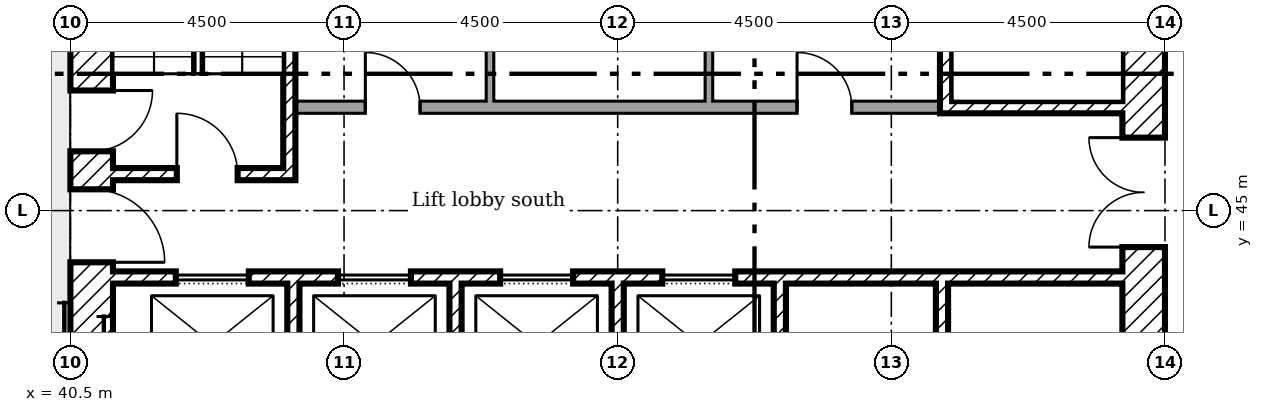
"""IFC4 building model, lengths in metres.
Left out: names, types, materials, properties, quantities, classifications, styles, units other than length and angle.
Written with IfcOpenShell. Run it as: python <this file> out.ifc"""

import sys

from ifc_helpers import new_model, si_unit, direction, frame, frame_2d, origin, place, context, subcontext, project, spatial, rectangle, extrude, element, fill, save


model = new_model("IFC4")
c1 = context("Model", 3, precision=1e-05, world=origin(), true_north=direction((0.0, 1.0)))
c2 = subcontext(c1, "Body", "Model", "MODEL_VIEW")
j1 = project(units=[si_unit("LENGTHUNIT", "METRE"), si_unit("PLANEANGLEUNIT", "RADIAN")], contexts=[c1])
p1 = place(None, origin())
s1 = spatial("IfcSite", under=j1, at=p1, CompositionType="ELEMENT")
p2 = place(p1, origin())
s2 = spatial("IfcBuilding", under=s1, at=p2, CompositionType="ELEMENT")
p3 = place(p2, frame((0.0, 0.0, 92.0)))
s3 = spatial("IfcBuildingStorey", under=s2, at=p3, CompositionType="ELEMENT", Elevation=92.0)
p4 = place(p3, frame((58.15, 40.5, 0.0), z_axis=(0.0, 0.0, 1.0), x_axis=(0.0, 1.0, 0.0)))
e1 = element("IfcWall", 1, at=p4, inside=s3, PredefinedType="SHEAR", context=c2, shape_type="SweptSolid", body=[
    extrude(rectangle(XDim=18.0, YDim=0.7, at=frame_2d((9.0, 0.0))), origin(), (0.0, 0.0, 1.0), 3.35),
])
p5 = place(p4, frame((13.15, 0.0, 0.0)))
e2 = element("IfcOpeningElement", 2, at=p5, cuts=e1, PredefinedType="OPENING", context=c2, shape_type="SweptSolid", body=[
    extrude(rectangle(XDim=1.2, YDim=2.1, at=frame_2d((0.6, 1.05))), frame((0.0, 0.36, 0.0), z_axis=(0.0, -1.0, 0.0), x_axis=(1.0, 0.0, 0.0)), (0.0, 0.0, 1.0), 0.72),
])
p6 = place(p4, frame((3.9, 0.0, 0.0)))
e3 = element("IfcOpeningElement", 3, at=p6, cuts=e1, PredefinedType="OPENING", context=c2, shape_type="SweptSolid", body=[
    extrude(rectangle(XDim=1.8, YDim=2.1, at=frame_2d((0.9, 1.05))), frame((0.0, 0.36, 0.0), z_axis=(0.0, -1.0, 0.0), x_axis=(1.0, 0.0, 0.0)), (0.0, 0.0, 1.0), 0.72),
])
p7 = place(p4, frame((11.525, 0.0, 0.0)))
e4 = element("IfcOpeningElement", 4, at=p7, cuts=e1, PredefinedType="OPENING", context=c2, shape_type="SweptSolid", body=[
    extrude(rectangle(XDim=1.0, YDim=2.1, at=frame_2d((0.5, 1.05))), frame((0.0, 0.36, 0.0), z_axis=(0.0, -1.0, 0.0), x_axis=(1.0, 0.0, 0.0)), (0.0, 0.0, 1.0), 0.72),
])
p8 = place(p3, frame((40.85, 40.5, 0.0), z_axis=(0.0, 0.0, 1.0), x_axis=(0.0, 1.0, 0.0)))
e5 = element("IfcWall", 5, at=p8, inside=s3, PredefinedType="SHEAR", context=c2, shape_type="SweptSolid", body=[
    extrude(rectangle(XDim=18.0, YDim=0.7, at=frame_2d((9.0, 0.0))), origin(), (0.0, 0.0, 1.0), 3.35),
])
p9 = place(p8, frame((3.65, 0.0, 0.0)))
e6 = element("IfcOpeningElement", 6, at=p9, cuts=e5, PredefinedType="OPENING", context=c2, shape_type="SweptSolid", body=[
    extrude(rectangle(XDim=1.2, YDim=2.1, at=frame_2d((0.6, 1.05))), frame((0.0, 0.36, 0.0), z_axis=(0.0, -1.0, 0.0), x_axis=(1.0, 0.0, 0.0)), (0.0, 0.0, 1.0), 0.72),
])
p10 = place(p8, frame((5.475, 0.0, 0.0)))
e7 = element("IfcOpeningElement", 7, at=p10, cuts=e5, PredefinedType="OPENING", context=c2, shape_type="SweptSolid", body=[
    extrude(rectangle(XDim=1.0, YDim=2.1, at=frame_2d((0.5, 1.05))), frame((0.0, 0.36, 0.0), z_axis=(0.0, -1.0, 0.0), x_axis=(1.0, 0.0, 0.0)), (0.0, 0.0, 1.0), 0.72),
])
p11 = place(p8, frame((12.3, 0.0, 0.0)))
e8 = element("IfcOpeningElement", 8, at=p11, cuts=e5, PredefinedType="OPENING", context=c2, shape_type="SweptSolid", body=[
    extrude(rectangle(XDim=1.0, YDim=2.1, at=frame_2d((0.5, 1.05))), frame((0.0, 0.36, 0.0), z_axis=(0.0, -1.0, 0.0), x_axis=(1.0, 0.0, 0.0)), (0.0, 0.0, 1.0), 0.72),
])
for number, where, z_axis, x_axis in (
    (9, (44.167, 41.2, 0.0), (0.0, 0.0, 1.0), (0.0, 1.0, 0.0)),
    (10, (46.833, 41.2, 0.0), (0.0, 0.0, 1.0), (0.0, 1.0, 0.0)),
    (11, (49.5, 41.2, 0.0), (0.0, 0.0, 1.0), (0.0, 1.0, 0.0)),
    (12, (52.167, 41.2, 0.0), (0.0, 0.0, 1.0), (0.0, 1.0, 0.0)),
    (13, (54.833, 41.2, 0.0), (0.0, 0.0, 1.0), (0.0, 1.0, 0.0)),
):
    element("IfcWall", number, at=place(p3, frame(where, z_axis=z_axis, x_axis=x_axis)), inside=s3, PredefinedType="SHEAR", context=c2, shape_type="SweptSolid", body=[
        extrude(rectangle(XDim=2.6, YDim=0.2, at=frame_2d((1.3, 0.0))), origin(), (0.0, 0.0, 1.0), 3.35),
    ])
p12 = place(p3, frame((41.2, 43.9, 0.0)))
e14 = element("IfcWall", 14, at=p12, inside=s3, PredefinedType="SHEAR", context=c2, shape_type="SweptSolid", body=[
    extrude(rectangle(XDim=16.6, YDim=0.2, at=frame_2d((8.3, 0.0))), origin(), (0.0, 0.0, 1.0), 3.35),
])
p13 = place(p12, frame((1.033, 0.0, 0.0)))
e15 = element("IfcOpeningElement", 15, at=p13, cuts=e14, PredefinedType="OPENING", context=c2, shape_type="SweptSolid", body=[
    extrude(rectangle(XDim=1.2, YDim=2.1, at=frame_2d((0.6, 1.05))), frame((0.0, 0.11, 0.0), z_axis=(0.0, -1.0, 0.0), x_axis=(1.0, 0.0, 0.0)), (0.0, 0.0, 1.0), 0.22),
])
p14 = place(p12, frame((3.7, 0.0, 0.0)))
e16 = element("IfcOpeningElement", 16, at=p14, cuts=e14, PredefinedType="OPENING", context=c2, shape_type="SweptSolid", body=[
    extrude(rectangle(XDim=1.2, YDim=2.1, at=frame_2d((0.6, 1.05))), frame((0.0, 0.11, 0.0), z_axis=(0.0, -1.0, 0.0), x_axis=(1.0, 0.0, 0.0)), (0.0, 0.0, 1.0), 0.22),
])
p15 = place(p12, frame((6.367, 0.0, 0.0)))
e17 = element("IfcOpeningElement", 17, at=p15, cuts=e14, PredefinedType="OPENING", context=c2, shape_type="SweptSolid", body=[
    extrude(rectangle(XDim=1.2, YDim=2.1, at=frame_2d((0.6, 1.05))), frame((0.0, 0.11, 0.0), z_axis=(0.0, -1.0, 0.0), x_axis=(1.0, 0.0, 0.0)), (0.0, 0.0, 1.0), 0.22),
])
p16 = place(p12, frame((9.033, 0.0, 0.0)))
e18 = element("IfcOpeningElement", 18, at=p16, cuts=e14, PredefinedType="OPENING", context=c2, shape_type="SweptSolid", body=[
    extrude(rectangle(XDim=1.2, YDim=2.1, at=frame_2d((0.6, 1.05))), frame((0.0, 0.11, 0.0), z_axis=(0.0, -1.0, 0.0), x_axis=(1.0, 0.0, 0.0)), (0.0, 0.0, 1.0), 0.22),
])
p17 = place(p3, frame((44.1, 45.5, 0.0), z_axis=(0.0, 0.0, 1.0), x_axis=(0.0, 1.0, 0.0)))
e19 = element("IfcWall", 19, at=p17, inside=s3, PredefinedType="SHEAR", context=c2, shape_type="SweptSolid", body=[
    extrude(rectangle(XDim=6.9, YDim=0.2, at=frame_2d((3.45, 0.0))), origin(), (0.0, 0.0, 1.0), 3.35),
])
p18 = place(p3, frame((41.2, 45.6, 0.0)))
e20 = element("IfcWall", 20, at=p18, inside=s3, PredefinedType="SHEAR", context=c2, shape_type="SweptSolid", body=[
    extrude(rectangle(XDim=2.8, YDim=0.2, at=frame_2d((1.4, 0.0))), origin(), (0.0, 0.0, 1.0), 3.35),
])
p19 = place(p18, frame((1.05, 0.0, 0.0)))
e21 = element("IfcOpeningElement", 21, at=p19, cuts=e20, PredefinedType="OPENING", context=c2, shape_type="SweptSolid", body=[
    extrude(rectangle(XDim=1.0, YDim=2.1, at=frame_2d((0.5, 1.05))), frame((0.0, 0.11, 0.0), z_axis=(0.0, -1.0, 0.0), x_axis=(1.0, 0.0, 0.0)), (0.0, 0.0, 1.0), 0.22),
])
p20 = place(p3, frame((54.8, 46.7, 0.0)))
e22 = element("IfcWall", 22, at=p20, inside=s3, PredefinedType="SHEAR", context=c2, shape_type="SweptSolid", body=[
    extrude(rectangle(XDim=3.0, YDim=0.2, at=frame_2d((1.5, 0.0))), origin(), (0.0, 0.0, 1.0), 3.35),
])
p21 = place(p3, frame((54.9, 46.8, 0.0), z_axis=(0.0, 0.0, 1.0), x_axis=(0.0, 1.0, 0.0)))
e23 = element("IfcWall", 23, at=p21, inside=s3, PredefinedType="SHEAR", context=c2, shape_type="SweptSolid", body=[
    extrude(rectangle(XDim=6.5, YDim=0.2, at=frame_2d((3.25, 0.0))), origin(), (0.0, 0.0, 1.0), 3.35),
])
p22 = place(p3, frame((44.2, 46.7, 0.0)))
e24 = element("IfcWall", 24, at=p22, inside=s3, PredefinedType="PARTITIONING", context=c2, shape_type="SweptSolid", body=[
    extrude(rectangle(XDim=10.6, YDim=0.2, at=frame_2d((5.3, 0.0))), origin(), (0.0, 0.0, 1.0), 3.35),
])
p23 = place(p22, frame((1.15, 0.0, 0.0)))
e25 = element("IfcOpeningElement", 25, at=p23, cuts=e24, PredefinedType="OPENING", context=c2, shape_type="SweptSolid", body=[
    extrude(rectangle(XDim=0.9, YDim=2.1, at=frame_2d((0.45, 1.05))), frame((0.0, 0.11, 0.0), z_axis=(0.0, -1.0, 0.0), x_axis=(1.0, 0.0, 0.0)), (0.0, 0.0, 1.0), 0.22),
])
p24 = place(p22, frame((8.25, 0.0, 0.0)))
e26 = element("IfcOpeningElement", 26, at=p24, cuts=e24, PredefinedType="OPENING", context=c2, shape_type="SweptSolid", body=[
    extrude(rectangle(XDim=0.9, YDim=2.1, at=frame_2d((0.45, 1.05))), frame((0.0, 0.11, 0.0), z_axis=(0.0, -1.0, 0.0), x_axis=(1.0, 0.0, 0.0)), (0.0, 0.0, 1.0), 0.22),
])
p25 = place(p3, frame((47.4, 46.8, 0.0), z_axis=(0.0, 0.0, 1.0), x_axis=(0.0, 1.0, 0.0)))
e27 = element("IfcWall", 27, at=p25, inside=s3, PredefinedType="PARTITIONING", context=c2, shape_type="SweptSolid", body=[
    extrude(rectangle(XDim=5.0, YDim=0.125, at=frame_2d((2.5, 0.0))), origin(), (0.0, 0.0, 1.0), 3.35),
])
p26 = place(p3, frame((51.0, 46.8, 0.0), z_axis=(0.0, 0.0, 1.0), x_axis=(0.0, 1.0, 0.0)))
e28 = element("IfcWall", 28, at=p26, inside=s3, PredefinedType="PARTITIONING", context=c2, shape_type="SweptSolid", body=[
    extrude(rectangle(XDim=2.262, YDim=0.125, at=frame_2d((1.131, 0.0))), origin(), (0.0, 0.0, 1.0), 3.35),
])
p27 = place(p6, origin())
e29 = element("IfcDoor", 29, at=p27, inside=s3, OperationType="DOUBLE_DOOR_SINGLE_SWING", PredefinedType="DOOR", context=c2, shape_type="SweptSolid", body=[
    extrude(rectangle(XDim=1.8, YDim=2.1, at=frame_2d((0.9, 1.05))), frame((0.0, 0.025, 0.0), z_axis=(0.0, -1.0, 0.0), x_axis=(1.0, 0.0, 0.0)), (0.0, 0.0, 1.0), 0.05),
])
fill(e3, e29)
p28 = place(p9, frame((1.2, 0.0, 0.0), x_axis=(-1.0, 0.0, 0.0)))
e30 = element("IfcDoor", 30, at=p28, inside=s3, OperationType="SINGLE_SWING_LEFT", PredefinedType="DOOR", context=c2, shape_type="SweptSolid", body=[
    extrude(rectangle(XDim=1.2, YDim=2.1, at=frame_2d((0.6, 1.05))), frame((0.0, 0.025, 0.0), z_axis=(0.0, -1.0, 0.0), x_axis=(1.0, 0.0, 0.0)), (0.0, 0.0, 1.0), 0.05),
])
fill(e6, e30)
p29 = place(p19, origin())
e31 = element("IfcDoor", 31, at=p29, inside=s3, OperationType="SINGLE_SWING_RIGHT", PredefinedType="DOOR", context=c2, shape_type="SweptSolid", body=[
    extrude(rectangle(XDim=1.0, YDim=2.1, at=frame_2d((0.5, 1.05))), frame((0.0, 0.025, 0.0), z_axis=(0.0, -1.0, 0.0), x_axis=(1.0, 0.0, 0.0)), (0.0, 0.0, 1.0), 0.05),
])
fill(e21, e31)
p30 = place(p10, frame((1.0, 0.0, 0.0), x_axis=(-1.0, 0.0, 0.0)))
e32 = element("IfcDoor", 32, at=p30, inside=s3, OperationType="SINGLE_SWING_RIGHT", PredefinedType="DOOR", context=c2, shape_type="SweptSolid", body=[
    extrude(rectangle(XDim=1.0, YDim=2.1, at=frame_2d((0.5, 1.05))), frame((0.0, 0.025, 0.0), z_axis=(0.0, -1.0, 0.0), x_axis=(1.0, 0.0, 0.0)), (0.0, 0.0, 1.0), 0.05),
])
fill(e7, e32)
p31 = place(p23, origin())
e33 = element("IfcDoor", 33, at=p31, inside=s3, OperationType="SINGLE_SWING_RIGHT", PredefinedType="DOOR", context=c2, shape_type="SweptSolid", body=[
    extrude(rectangle(XDim=0.9, YDim=2.1, at=frame_2d((0.45, 1.05))), frame((0.0, 0.025, 0.0), z_axis=(0.0, -1.0, 0.0), x_axis=(1.0, 0.0, 0.0)), (0.0, 0.0, 1.0), 0.05),
])
fill(e25, e33)
p32 = place(p24, origin())
e34 = element("IfcDoor", 34, at=p32, inside=s3, OperationType="SINGLE_SWING_RIGHT", PredefinedType="DOOR", context=c2, shape_type="SweptSolid", body=[
    extrude(rectangle(XDim=0.9, YDim=2.1, at=frame_2d((0.45, 1.05))), frame((0.0, 0.025, 0.0), z_axis=(0.0, -1.0, 0.0), x_axis=(1.0, 0.0, 0.0)), (0.0, 0.0, 1.0), 0.05),
])
fill(e26, e34)
p33 = place(p13, origin())
e35 = element("IfcDoor", 35, at=p33, inside=s3, OperationType="SLIDING_TO_LEFT", PredefinedType="DOOR", context=c2, shape_type="SweptSolid", body=[
    extrude(rectangle(XDim=1.2, YDim=2.1, at=frame_2d((0.6, 1.05))), frame((0.0, 0.025, 0.0), z_axis=(0.0, -1.0, 0.0), x_axis=(1.0, 0.0, 0.0)), (0.0, 0.0, 1.0), 0.05),
])
fill(e15, e35)
p34 = place(p14, origin())
e36 = element("IfcDoor", 36, at=p34, inside=s3, OperationType="SLIDING_TO_LEFT", PredefinedType="DOOR", context=c2, shape_type="SweptSolid", body=[
    extrude(rectangle(XDim=1.2, YDim=2.1, at=frame_2d((0.6, 1.05))), frame((0.0, 0.025, 0.0), z_axis=(0.0, -1.0, 0.0), x_axis=(1.0, 0.0, 0.0)), (0.0, 0.0, 1.0), 0.05),
])
fill(e16, e36)
p35 = place(p15, origin())
e37 = element("IfcDoor", 37, at=p35, inside=s3, OperationType="SLIDING_TO_LEFT", PredefinedType="DOOR", context=c2, shape_type="SweptSolid", body=[
    extrude(rectangle(XDim=1.2, YDim=2.1, at=frame_2d((0.6, 1.05))), frame((0.0, 0.025, 0.0), z_axis=(0.0, -1.0, 0.0), x_axis=(1.0, 0.0, 0.0)), (0.0, 0.0, 1.0), 0.05),
])
fill(e17, e37)
p36 = place(p16, origin())
e38 = element("IfcDoor", 38, at=p36, inside=s3, OperationType="SLIDING_TO_LEFT", PredefinedType="DOOR", context=c2, shape_type="SweptSolid", body=[
    extrude(rectangle(XDim=1.2, YDim=2.1, at=frame_2d((0.6, 1.05))), frame((0.0, 0.025, 0.0), z_axis=(0.0, -1.0, 0.0), x_axis=(1.0, 0.0, 0.0)), (0.0, 0.0, 1.0), 0.05),
])
fill(e18, e38)
save(model, sys.argv[1])
